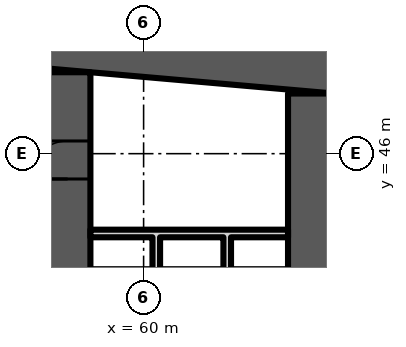
"""IFC4 building model, lengths in metres.
Left out: names, types, materials, properties, quantities, classifications, styles, units other than length and angle.
Written with IfcOpenShell. Run it as: python <this file> out.ifc"""

import sys

from ifc_helpers import new_model, si_unit, direction, frame, frame_2d, origin, place, context, subcontext, project, spatial, polyline, rectangle, outline, extrude, element, fill, save


model = new_model("IFC4")
c1 = context("Model", 3, precision=1e-05, world=origin(), true_north=direction((0.0, 1.0)))
c2 = subcontext(c1, "Body", "Model", "MODEL_VIEW")
j1 = project(units=[si_unit("LENGTHUNIT", "METRE"), si_unit("PLANEANGLEUNIT", "RADIAN")], contexts=[c1])
p1 = place(None, origin())
s1 = spatial("IfcSite", under=j1, at=p1, CompositionType="ELEMENT")
p2 = place(p1, origin())
s2 = spatial("IfcBuilding", under=s1, at=p2, CompositionType="ELEMENT")
p3 = place(p2, frame((0.0, 0.0, 52.3)))
s3 = spatial("IfcBuildingStorey", under=s2, at=p3, CompositionType="ELEMENT", Elevation=52.3)
p4 = place(p3, frame((0.0, 0.0, -0.0)))
e1 = element("IfcWall", 1, at=p4, inside=s3, PredefinedType="SHEAR", context=c2, shape_type="SweptSolid", body=[
    extrude(outline(polyline([(9.0, 47.583), (37.0, 50.032), (65.0, 47.583), (65.0, 48.787), (37.0, 51.237), (9.0, 48.787), (9.0, 47.583)])), origin(), (0.0, 0.0, 1.0), 3.6),
])
p5 = place(p3, frame((58.0, 35.2, 0.0), z_axis=(0.0, 0.0, 1.0), x_axis=(0.0, 1.0, 0.0)))
e2 = element("IfcWall", 2, at=p5, inside=s3, PredefinedType="SHEAR", context=c2, shape_type="SweptSolid", body=[
    extrude(rectangle(XDim=12.943, YDim=1.2, at=frame_2d((6.471, 0.0))), origin(), (0.0, 0.0, 1.0), 3.6),
])
p6 = place(p5, frame((10.134, 0.0, 0.0)))
e3 = element("IfcOpeningElement", 3, at=p6, cuts=e2, PredefinedType="OPENING", context=c2, shape_type="SweptSolid", body=[
    extrude(rectangle(XDim=1.0, YDim=2.1, at=frame_2d((0.5, 1.05))), frame((0.0, 0.61, 0.0), z_axis=(0.0, -1.0, 0.0), x_axis=(1.0, 0.0, 0.0)), (0.0, 0.0, 1.0), 1.22),
])
p7 = place(p5, frame((3.2, 0.0, 0.0)))
e4 = element("IfcOpeningElement", 4, at=p7, cuts=e2, PredefinedType="OPENING", context=c2, shape_type="SweptSolid", body=[
    extrude(rectangle(XDim=1.1, YDim=2.1, at=frame_2d((0.55, 1.05))), frame((0.0, 0.61, 0.0), z_axis=(0.0, -1.0, 0.0), x_axis=(1.0, 0.0, 0.0)), (0.0, 0.0, 1.0), 1.22),
])
p8 = place(p3, frame((64.4, 35.2, 0.0), z_axis=(0.0, 0.0, 1.0), x_axis=(0.0, 1.0, 0.0)))
e5 = element("IfcWall", 5, at=p8, inside=s3, PredefinedType="SHEAR", context=c2, shape_type="SweptSolid", body=[
    extrude(rectangle(XDim=12.383, YDim=1.2, at=frame_2d((6.191, 0.0))), origin(), (0.0, 0.0, 1.0), 3.6),
])
p9 = place(p3, frame((0.0, 0.0, -0.0)))
e6 = element("IfcWall", 6, at=p9, inside=s3, PredefinedType="PARTITIONING", context=c2, shape_type="SweptSolid", body=[
    extrude(outline(polyline([(60.433, 40.8), (60.233, 40.8), (60.233, 43.8), (58.6, 43.8), (58.6, 44.0), (63.8, 44.0), (63.8, 43.8), (62.3, 43.8), (62.3, 40.8), (62.1, 40.8), (62.1, 43.8), (60.433, 43.8), (60.433, 40.8)])), origin(), (0.0, 0.0, 1.0), 3.2),
])
p10 = place(p6, origin())
e7 = element("IfcDoor", 7, at=p10, inside=s3, OperationType="SINGLE_SWING_LEFT", PredefinedType="DOOR", context=c2, shape_type="SweptSolid", body=[
    extrude(rectangle(XDim=1.0, YDim=2.1, at=frame_2d((0.5, 1.05))), frame((0.0, 0.6, 0.0), z_axis=(0.0, -1.0, 0.0), x_axis=(1.0, 0.0, 0.0)), (0.0, 0.0, 1.0), 1.199),
])
fill(e3, e7)
save(model, sys.argv[1])
